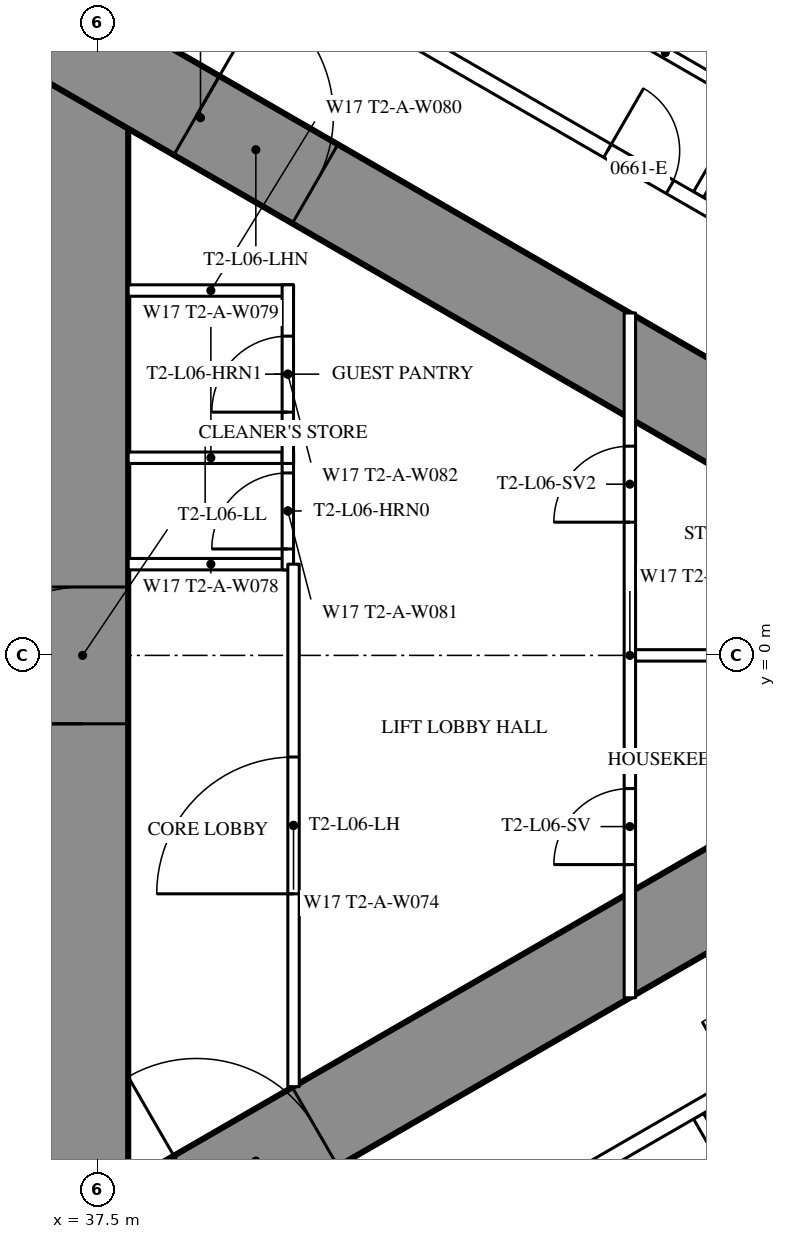
"""IFC4 building model, lengths in metres.
Left out: names, types, materials, properties, quantities, classifications, styles, units other than length and angle.
Written with IfcOpenShell. Run it as: python <this file> out.ifc"""

import sys

from ifc_helpers import new_model, si_unit, direction, frame, frame_2d, origin, place, context, subcontext, project, spatial, rectangle, extrude, element, fill, save


model = new_model("IFC4")
c1 = context("Model", 3, precision=1e-05, world=origin(), true_north=direction((0.0, 1.0)))
c2 = subcontext(c1, "Body", "Model", "MODEL_VIEW")
j1 = project(units=[si_unit("LENGTHUNIT", "METRE"), si_unit("PLANEANGLEUNIT", "RADIAN")], contexts=[c1])
p1 = place(None, origin())
s1 = spatial("IfcSite", under=j1, at=p1, CompositionType="ELEMENT")
p2 = place(p1, origin())
s2 = spatial("IfcBuilding", under=s1, at=p2, CompositionType="ELEMENT")
p3 = place(p2, frame((0.0, 0.0, 28.5)))
s3 = spatial("IfcBuildingStorey", under=s2, at=p3, CompositionType="ELEMENT", Elevation=28.5)
p4 = place(p3, frame((37.3, -8.6, 0.0), z_axis=(0.0, 0.0, 1.0), x_axis=(0.0, 1.0, 0.0)))
e1 = element("IfcWall", 1, at=p4, inside=s3, PredefinedType="SHEAR", context=c2, shape_type="SweptSolid", body=[
    extrude(rectangle(XDim=17.2, YDim=1.2, at=frame_2d((8.6, 0.0))), origin(), (0.0, 0.0, 1.0), 3.5),
])
p5 = place(p4, frame((7.7, 0.0, 0.0)))
e2 = element("IfcOpeningElement", 2, at=p5, cuts=e1, PredefinedType="OPENING", context=c2, shape_type="SweptSolid", body=[
    extrude(rectangle(XDim=1.8, YDim=2.2, at=frame_2d((0.9, 1.1))), frame((0.0, 0.61, 0.0), z_axis=(0.0, -1.0, 0.0), x_axis=(1.0, 0.0, 0.0)), (0.0, 0.0, 1.0), 1.22),
])
p6 = place(p3, frame((27.2, -13.8, 0.0), z_axis=(0.0, 0.0, 1.0), x_axis=(0.866027159892, 0.499996958321, 0.0)))
e3 = element("IfcWall", 3, at=p6, inside=s3, PredefinedType="SHEAR", context=c2, shape_type="SweptSolid", body=[
    extrude(rectangle(XDim=27.947, YDim=1.2, at=frame_2d((13.973, 0.0))), origin(), (0.0, 0.0, 1.0), 3.5),
])
p7 = place(p6, frame((4.6, 0.0, 0.0)))
e4 = element("IfcOpeningElement", 4, at=p7, cuts=e3, PredefinedType="OPENING", context=c2, shape_type="SweptSolid", body=[
    extrude(rectangle(XDim=1.0, YDim=2.2, at=frame_2d((0.5, 1.1))), frame((0.0, 0.61, 0.0), z_axis=(0.0, -1.0, 0.0), x_axis=(1.0, 0.0, 0.0)), (0.0, 0.0, 1.0), 1.22),
])
p8 = place(p6, frame((13.395, 0.0, 0.0)))
e5 = element("IfcOpeningElement", 5, at=p8, cuts=e3, PredefinedType="OPENING", context=c2, shape_type="SweptSolid", body=[
    extrude(rectangle(XDim=1.8, YDim=2.2, at=frame_2d((0.9, 1.1))), frame((0.0, 0.61, 0.0), z_axis=(0.0, -1.0, 0.0), x_axis=(1.0, 0.0, 0.0)), (0.0, 0.0, 1.0), 1.22),
])
p9 = place(p3, frame((27.2, 13.8, 0.0), z_axis=(0.0, 0.0, 1.0), x_axis=(0.866024515034, -0.500001539357, 0.0)))
e6 = element("IfcWall", 6, at=p9, inside=s3, PredefinedType="SHEAR", context=c2, shape_type="SweptSolid", body=[
    extrude(rectangle(XDim=26.907, YDim=1.2, at=frame_2d((13.454, 0.0))), origin(), (0.0, 0.0, 1.0), 3.5),
])
p10 = place(p9, frame((4.6, 0.0, 0.0)))
e7 = element("IfcOpeningElement", 7, at=p10, cuts=e6, PredefinedType="OPENING", context=c2, shape_type="SweptSolid", body=[
    extrude(rectangle(XDim=1.0, YDim=2.2, at=frame_2d((0.5, 1.1))), frame((0.0, 0.61, 0.0), z_axis=(0.0, -1.0, 0.0), x_axis=(1.0, 0.0, 0.0)), (0.0, 0.0, 1.0), 1.22),
])
p11 = place(p9, frame((13.395, 0.0, 0.0)))
e8 = element("IfcOpeningElement", 8, at=p11, cuts=e6, PredefinedType="OPENING", context=c2, shape_type="SweptSolid", body=[
    extrude(rectangle(XDim=1.8, YDim=2.2, at=frame_2d((0.9, 1.1))), frame((0.0, 0.61, 0.0), z_axis=(0.0, -1.0, 0.0), x_axis=(1.0, 0.0, 0.0)), (0.0, 0.0, 1.0), 1.22),
])
p12 = place(p3, frame((45.403, -6.062, 0.0), z_axis=(0.0, 0.0, 1.0), x_axis=(0.500007077968, -0.866021317279, 0.0)))
e9 = element("IfcWall", 9, at=p12, inside=s3, PredefinedType="PARTITIONING", context=c2, shape_type="SweptSolid", body=[
    extrude(rectangle(XDim=12.721, YDim=0.15, at=frame_2d((6.361, 0.0))), origin(), (0.0, 0.0, 1.0), 3.25),
])
p13 = place(p3, frame((45.403, 6.062, 0.0), z_axis=(0.0, 0.0, 1.0), x_axis=(0.500013434677, 0.866017647131, 0.0)))
e10 = element("IfcWall", 10, at=p13, inside=s3, PredefinedType="PARTITIONING", context=c2, shape_type="SweptSolid", body=[
    extrude(rectangle(XDim=9.902, YDim=0.15, at=frame_2d((4.951, 0.0))), origin(), (0.0, 0.0, 1.0), 2.25),
])
p14 = place(p3, frame((37.96, -10.243, 0.0), z_axis=(0.0, 0.0, 1.0), x_axis=(0.866026429433, 0.499998223521, 0.0)))
e11 = element("IfcWall", 11, at=p14, inside=s3, PredefinedType="PARTITIONING", context=c2, shape_type="SweptSolid", body=[
    extrude(rectangle(XDim=20.487, YDim=0.2, at=frame_2d((10.243, 0.0))), origin(), (0.0, 0.0, 1.0), 3.25),
])
p15 = place(p14, frame((4.575, 0.0, 0.0)))
e12 = element("IfcOpeningElement", 12, at=p15, cuts=e11, PredefinedType="OPENING", context=c2, shape_type="SweptSolid", body=[
    extrude(rectangle(XDim=0.95, YDim=2.2, at=frame_2d((0.475, 1.1))), frame((0.0, 0.11, 0.0), z_axis=(0.0, -1.0, 0.0), x_axis=(1.0, 0.0, 0.0)), (0.0, 0.0, 1.0), 0.22),
])
p16 = place(p14, frame((9.199, 0.0, 0.0)))
e13 = element("IfcOpeningElement", 13, at=p16, cuts=e11, PredefinedType="OPENING", context=c2, shape_type="SweptSolid", body=[
    extrude(rectangle(XDim=0.95, YDim=2.2, at=frame_2d((0.475, 1.1))), frame((0.0, 0.11, 0.0), z_axis=(0.0, -1.0, 0.0), x_axis=(1.0, 0.0, 0.0)), (0.0, 0.0, 1.0), 0.22),
])
p17 = place(p14, frame((15.599, 0.0, 0.0)))
e14 = element("IfcOpeningElement", 14, at=p17, cuts=e11, PredefinedType="OPENING", context=c2, shape_type="SweptSolid", body=[
    extrude(rectangle(XDim=0.95, YDim=2.2, at=frame_2d((0.475, 1.1))), frame((0.0, 0.11, 0.0), z_axis=(0.0, -1.0, 0.0), x_axis=(1.0, 0.0, 0.0)), (0.0, 0.0, 1.0), 0.22),
])
p18 = place(p14, frame((2.875, 0.0, 0.0)))
e15 = element("IfcOpeningElement", 15, at=p18, cuts=e11, PredefinedType="OPENING", context=c2, shape_type="SweptSolid", body=[
    extrude(rectangle(XDim=0.95, YDim=2.2, at=frame_2d((0.475, 1.1))), frame((0.0, 0.11, 0.0), z_axis=(0.0, -1.0, 0.0), x_axis=(1.0, 0.0, 0.0)), (0.0, 0.0, 1.0), 0.22),
])
p19 = place(p3, frame((41.619, 8.131, 0.0), z_axis=(0.0, 0.0, 1.0), x_axis=(0.86603245327, -0.499987789734, 0.0)))
e16 = element("IfcWall", 16, at=p19, inside=s3, PredefinedType="PARTITIONING", context=c2, shape_type="SweptSolid", body=[
    extrude(rectangle(XDim=16.142, YDim=0.2, at=frame_2d((8.071, 0.0))), origin(), (0.0, 0.0, 1.0), 3.25),
])
p20 = place(p19, frame((9.024, 0.0, 0.0)))
e17 = element("IfcOpeningElement", 17, at=p20, cuts=e16, PredefinedType="OPENING", context=c2, shape_type="SweptSolid", body=[
    extrude(rectangle(XDim=0.95, YDim=2.2, at=frame_2d((0.475, 1.1))), frame((0.0, 0.11, 0.0), z_axis=(0.0, -1.0, 0.0), x_axis=(1.0, 0.0, 0.0)), (0.0, 0.0, 1.0), 0.22),
])
p21 = place(p19, frame((7.037, 0.0, 0.0)))
e18 = element("IfcOpeningElement", 18, at=p21, cuts=e16, PredefinedType="OPENING", context=c2, shape_type="SweptSolid", body=[
    extrude(rectangle(XDim=0.95, YDim=2.2, at=frame_2d((0.475, 1.1))), frame((0.0, 0.11, 0.0), z_axis=(0.0, -1.0, 0.0), x_axis=(1.0, 0.0, 0.0)), (0.0, 0.0, 1.0), 0.22),
])
p22 = place(p19, frame((2.987, 0.0, 0.0)))
e19 = element("IfcOpeningElement", 19, at=p22, cuts=e16, PredefinedType="OPENING", context=c2, shape_type="SweptSolid", body=[
    extrude(rectangle(XDim=0.95, YDim=2.2, at=frame_2d((0.475, 1.1))), frame((0.0, 0.11, 0.0), z_axis=(0.0, -1.0, 0.0), x_axis=(1.0, 0.0, 0.0)), (0.0, 0.0, 1.0), 0.22),
])
p23 = place(p3, frame((43.895, 8.549, 0.0), z_axis=(0.0, 0.0, 1.0), x_axis=(0.866031185235, -0.4999899861, 0.0)))
e20 = element("IfcWall", 20, at=p23, inside=s3, PredefinedType="PARTITIONING", context=c2, shape_type="SweptSolid", body=[
    extrude(rectangle(XDim=2.475, YDim=0.15, at=frame_2d((1.238, 0.0))), origin(), (0.0, 0.0, 1.0), 3.25),
])
for number, where, z_axis, x_axis in (
    (21, (37.9, 1.2, 0.0), (0.0, 0.0, 1.0), (1.0, 0.0, 0.0)),
    (22, (37.9, 2.6, 0.0), (0.0, 0.0, 1.0), (1.0, 0.0, 0.0)),
    (23, (37.9, 4.8, 0.0), (0.0, 0.0, 1.0), (1.0, 0.0, 0.0)),
):
    element("IfcWall", number, at=place(p3, frame(where, z_axis=z_axis, x_axis=x_axis)), inside=s3, PredefinedType="PARTITIONING", context=c2, shape_type="SweptSolid", body=[
        extrude(rectangle(XDim=2.175, YDim=0.15, at=frame_2d((1.087, 0.0))), origin(), (0.0, 0.0, 1.0), 3.25),
    ])
p24 = place(p3, frame((40.0, 1.125, 0.0), z_axis=(0.0, 0.0, 1.0), x_axis=(0.0, 1.0, 0.0)))
e24 = element("IfcWall", 24, at=p24, inside=s3, PredefinedType="PARTITIONING", context=c2, shape_type="SweptSolid", body=[
    extrude(rectangle(XDim=1.55, YDim=0.15, at=frame_2d((0.775, 0.0))), origin(), (0.0, 0.0, 1.0), 3.25),
])
p25 = place(p24, frame((0.275, 0.0, 0.0)))
e25 = element("IfcOpeningElement", 25, at=p25, cuts=e24, PredefinedType="OPENING", context=c2, shape_type="SweptSolid", body=[
    extrude(rectangle(XDim=1.0, YDim=2.2, at=frame_2d((0.5, 1.1))), frame((0.0, 0.085, 0.0), z_axis=(0.0, -1.0, 0.0), x_axis=(1.0, 0.0, 0.0)), (0.0, 0.0, 1.0), 0.17),
])
p26 = place(p3, frame((40.0, 2.525, 0.0), z_axis=(0.0, 0.0, 1.0), x_axis=(0.0, 1.0, 0.0)))
e26 = element("IfcWall", 26, at=p26, inside=s3, PredefinedType="PARTITIONING", context=c2, shape_type="SweptSolid", body=[
    extrude(rectangle(XDim=2.35, YDim=0.15, at=frame_2d((1.175, 0.0))), origin(), (0.0, 0.0, 1.0), 3.25),
])
p27 = place(p26, frame((0.675, 0.0, 0.0)))
e27 = element("IfcOpeningElement", 27, at=p27, cuts=e26, PredefinedType="OPENING", context=c2, shape_type="SweptSolid", body=[
    extrude(rectangle(XDim=1.0, YDim=2.2, at=frame_2d((0.5, 1.1))), frame((0.0, 0.085, 0.0), z_axis=(0.0, -1.0, 0.0), x_axis=(1.0, 0.0, 0.0)), (0.0, 0.0, 1.0), 0.17),
])
p28 = place(p3, frame((40.075, -5.674, 0.0), z_axis=(0.0, 0.0, 1.0), x_axis=(0.0, 1.0, 0.0)))
e28 = element("IfcWall", 28, at=p28, inside=s3, PredefinedType="PARTITIONING", context=c2, shape_type="SweptSolid", body=[
    extrude(rectangle(XDim=6.874, YDim=0.15, at=frame_2d((3.437, 0.0))), origin(), (0.0, 0.0, 1.0), 3.25),
])
p29 = place(p28, frame((2.537, 0.0, 0.0)))
e29 = element("IfcOpeningElement", 29, at=p29, cuts=e28, PredefinedType="OPENING", context=c2, shape_type="SweptSolid", body=[
    extrude(rectangle(XDim=1.8, YDim=2.2, at=frame_2d((0.9, 1.1))), frame((0.0, 0.085, 0.0), z_axis=(0.0, -1.0, 0.0), x_axis=(1.0, 0.0, 0.0)), (0.0, 0.0, 1.0), 0.17),
])
p30 = place(p3, frame((44.5, -4.505, 0.0), z_axis=(0.0, 0.0, 1.0), x_axis=(0.0, 1.0, 0.0)))
e30 = element("IfcWall", 30, at=p30, inside=s3, PredefinedType="PARTITIONING", context=c2, shape_type="SweptSolid", body=[
    extrude(rectangle(XDim=9.009, YDim=0.15, at=frame_2d((4.505, 0.0))), origin(), (0.0, 0.0, 1.0), 2.45),
])
p31 = place(p30, frame((1.752, 0.0, 0.0)))
e31 = element("IfcOpeningElement", 31, at=p31, cuts=e30, PredefinedType="OPENING", context=c2, shape_type="SweptSolid", body=[
    extrude(rectangle(XDim=1.0, YDim=2.2, at=frame_2d((0.5, 1.1))), frame((0.0, 0.085, 0.0), z_axis=(0.0, -1.0, 0.0), x_axis=(1.0, 0.0, 0.0)), (0.0, 0.0, 1.0), 0.17),
])
p32 = place(p30, frame((6.257, 0.0, 0.0)))
e32 = element("IfcOpeningElement", 32, at=p32, cuts=e30, PredefinedType="OPENING", context=c2, shape_type="SweptSolid", body=[
    extrude(rectangle(XDim=1.0, YDim=2.2, at=frame_2d((0.5, 1.1))), frame((0.0, 0.085, 0.0), z_axis=(0.0, -1.0, 0.0), x_axis=(1.0, 0.0, 0.0)), (0.0, 0.0, 1.0), 0.17),
])
p33 = place(p3, frame((44.575, 0.0, 0.0), z_axis=(0.0, 0.0, 1.0), x_axis=(1.0, 0.0, 0.0)))
e33 = element("IfcWall", 33, at=p33, inside=s3, PredefinedType="PARTITIONING", context=c2, shape_type="SweptSolid", body=[
    extrude(rectangle(XDim=7.727, YDim=0.15, at=frame_2d((3.864, 0.0))), origin(), (0.0, 0.0, 1.0), 2.25),
])
p34 = place(p22, origin())
e34 = element("IfcDoor", 34, at=p34, inside=s3, OperationType="SINGLE_SWING_LEFT", PredefinedType="DOOR", context=c2, shape_type="SweptSolid", body=[
    extrude(rectangle(XDim=0.95, YDim=2.2, at=frame_2d((0.475, 1.1))), frame((0.0, 0.025, 0.0), z_axis=(0.0, -1.0, 0.0), x_axis=(1.0, 0.0, 0.0)), (0.0, 0.0, 1.0), 0.05),
])
fill(e19, e34)
p35 = place(p25, origin())
e35 = element("IfcDoor", 35, at=p35, inside=s3, OperationType="SINGLE_SWING_LEFT", PredefinedType="DOOR", context=c2, shape_type="SweptSolid", body=[
    extrude(rectangle(XDim=1.0, YDim=2.2, at=frame_2d((0.5, 1.1))), frame((0.0, 0.025, 0.0), z_axis=(0.0, -1.0, 0.0), x_axis=(1.0, 0.0, 0.0)), (0.0, 0.0, 1.0), 0.05),
])
fill(e25, e35)
p36 = place(p27, origin())
e36 = element("IfcDoor", 36, at=p36, inside=s3, OperationType="SINGLE_SWING_LEFT", PredefinedType="DOOR", context=c2, shape_type="SweptSolid", body=[
    extrude(rectangle(XDim=1.0, YDim=2.2, at=frame_2d((0.5, 1.1))), frame((0.0, 0.025, 0.0), z_axis=(0.0, -1.0, 0.0), x_axis=(1.0, 0.0, 0.0)), (0.0, 0.0, 1.0), 0.05),
])
fill(e27, e36)
p37 = place(p29, origin())
e37 = element("IfcDoor", 37, at=p37, inside=s3, OperationType="DOUBLE_DOOR_SINGLE_SWING", PredefinedType="DOOR", context=c2, shape_type="SweptSolid", body=[
    extrude(rectangle(XDim=1.8, YDim=2.2, at=frame_2d((0.9, 1.1))), frame((0.0, 0.025, 0.0), z_axis=(0.0, -1.0, 0.0), x_axis=(1.0, 0.0, 0.0)), (0.0, 0.0, 1.0), 0.05),
])
fill(e29, e37)
p38 = place(p31, origin())
e38 = element("IfcDoor", 38, at=p38, inside=s3, OperationType="SINGLE_SWING_LEFT", PredefinedType="DOOR", context=c2, shape_type="SweptSolid", body=[
    extrude(rectangle(XDim=1.0, YDim=2.2, at=frame_2d((0.5, 1.1))), frame((0.0, 0.025, 0.0), z_axis=(0.0, -1.0, 0.0), x_axis=(1.0, 0.0, 0.0)), (0.0, 0.0, 1.0), 0.05),
])
fill(e31, e38)
p39 = place(p32, origin())
e39 = element("IfcDoor", 39, at=p39, inside=s3, OperationType="SINGLE_SWING_LEFT", PredefinedType="DOOR", context=c2, shape_type="SweptSolid", body=[
    extrude(rectangle(XDim=1.0, YDim=2.2, at=frame_2d((0.5, 1.1))), frame((0.0, 0.025, 0.0), z_axis=(0.0, -1.0, 0.0), x_axis=(1.0, 0.0, 0.0)), (0.0, 0.0, 1.0), 0.05),
])
fill(e32, e39)
p40 = place(p8, origin())
e40 = element("IfcDoor", 40, at=p40, inside=s3, OperationType="DOUBLE_DOOR_SINGLE_SWING", PredefinedType="DOOR", context=c2, shape_type="SweptSolid", body=[
    extrude(rectangle(XDim=1.8, YDim=2.2, at=frame_2d((0.9, 1.1))), frame((0.0, 0.025, 0.0), z_axis=(0.0, -1.0, 0.0), x_axis=(1.0, 0.0, 0.0)), (0.0, 0.0, 1.0), 0.05),
])
fill(e5, e40)
p41 = place(p11, origin())
e41 = element("IfcDoor", 41, at=p41, inside=s3, OperationType="DOUBLE_DOOR_SINGLE_SWING", PredefinedType="DOOR", context=c2, shape_type="SweptSolid", body=[
    extrude(rectangle(XDim=1.8, YDim=2.2, at=frame_2d((0.9, 1.1))), frame((0.0, 0.025, 0.0), z_axis=(0.0, -1.0, 0.0), x_axis=(1.0, 0.0, 0.0)), (0.0, 0.0, 1.0), 0.05),
])
fill(e8, e41)
p42 = place(p5, origin())
e42 = element("IfcDoor", 42, at=p42, inside=s3, OperationType="DOUBLE_DOOR_SINGLE_SWING", PredefinedType="DOOR", context=c2, shape_type="SweptSolid", body=[
    extrude(rectangle(XDim=1.8, YDim=2.2, at=frame_2d((0.9, 1.1))), frame((0.0, 0.025, 0.0), z_axis=(0.0, -1.0, 0.0), x_axis=(1.0, 0.0, 0.0)), (0.0, 0.0, 1.0), 0.05),
])
fill(e2, e42)
save(model, sys.argv[1])
